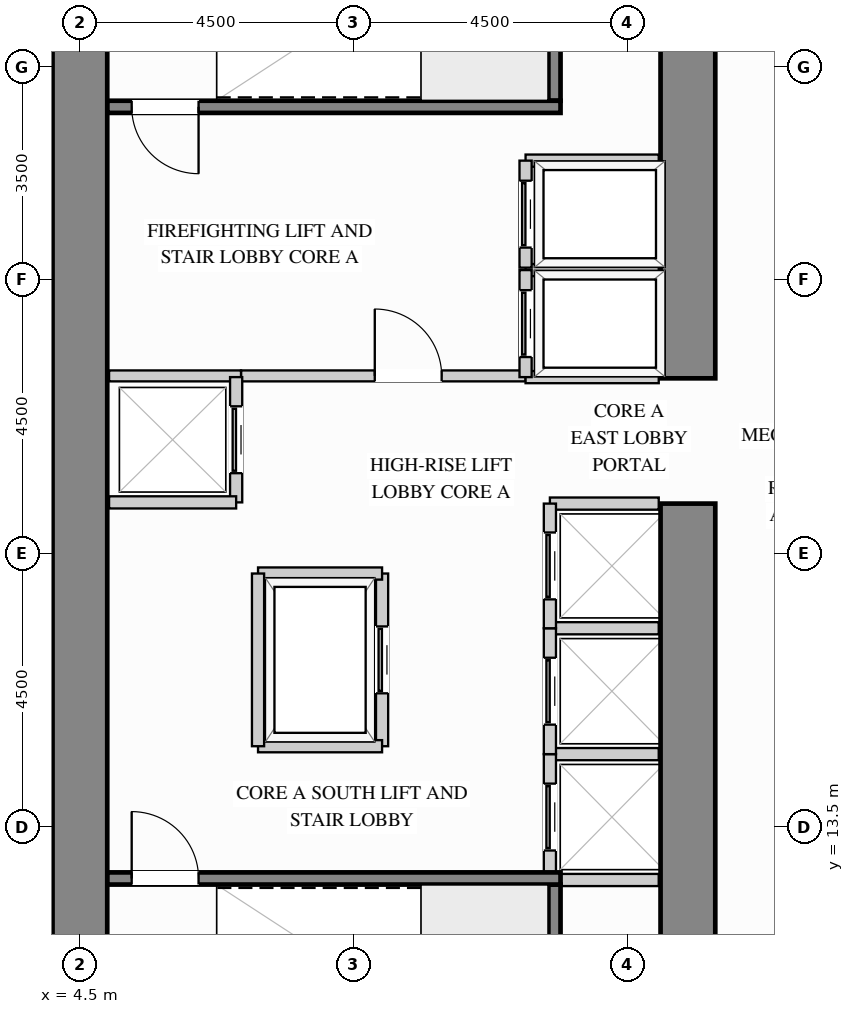
"""IFC4 building model, lengths in metres.
Left out: names, types, materials, properties, quantities, classifications, styles, units other than length and angle.
Written with IfcOpenShell. Run it as: python <this file> out.ifc"""

import sys

from ifc_helpers import new_model, si_unit, direction, frame, frame_2d, origin, place, context, subcontext, project, spatial, rectangle, extrude, source, transform, mapped, element, fill, save


model = new_model("IFC4")
c1 = context("Model", 3, precision=1e-05, world=origin(), true_north=direction((0.0, 1.0)))
c2 = subcontext(c1, "Body", "Model", "MODEL_VIEW")
j1 = project(units=[si_unit("LENGTHUNIT", "METRE"), si_unit("PLANEANGLEUNIT", "RADIAN")], contexts=[c1])
p1 = place(None, origin())
s1 = spatial("IfcSite", under=j1, at=p1, CompositionType="ELEMENT")
p2 = place(p1, origin())
s2 = spatial("IfcBuilding", under=s1, at=p2, CompositionType="ELEMENT")
p3 = place(p2, frame((0.0, 0.0, 72.9)))
s3 = spatial("IfcBuildingStorey", under=s2, at=p3, CompositionType="ELEMENT", Elevation=72.9)
m1 = source(origin(), c2, "Body", "SweptSolid", [
    extrude(rectangle(XDim=9.87, YDim=0.9, at=frame_2d((4.935, 0.0))), origin(), (0.0, 0.0, 1.0), 4.26),
])
p4 = place(p3, frame((14.5, 8.95, 0.0), z_axis=(0.0, 0.0, 1.0), x_axis=(0.0, 1.0, 0.0)))
e1 = element("IfcWall", 1, at=p4, inside=s3, PredefinedType="SHEAR", context=c2, shape_type="MappedRepresentation", body=[
    mapped(m1, transform((0.0, 0.0, 0.0), x_axis=(1.0, 0.0, 0.0), y_axis=(0.0, 1.0, 0.0), z_axis=(0.0, 0.0, 1.0))),
])
m2 = source(origin(), c2, "Body", "SweptSolid", [
    extrude(rectangle(XDim=8.17, YDim=0.9, at=frame_2d((4.085, 0.0))), origin(), (0.0, 0.0, 1.0), 4.26),
])
p5 = place(p3, frame((14.5, 20.88, 0.0), z_axis=(0.0, 0.0, 1.0), x_axis=(0.0, 1.0, 0.0)))
e2 = element("IfcWall", 2, at=p5, inside=s3, PredefinedType="SHEAR", context=c2, shape_type="MappedRepresentation", body=[
    mapped(m2, transform((0.0, 0.0, 0.0), x_axis=(1.0, 0.0, 0.0), y_axis=(0.0, 1.0, 0.0), z_axis=(0.0, 0.0, 1.0))),
])
m3 = source(origin(), c2, "Body", "SweptSolid", [
    extrude(rectangle(XDim=20.1, YDim=0.9, at=frame_2d((10.05, 0.0))), origin(), (0.0, 0.0, 1.0), 4.26),
])
p6 = place(p3, frame((4.5, 8.95, 0.0), z_axis=(0.0, 0.0, 1.0), x_axis=(0.0, 1.0, 0.0)))
e3 = element("IfcWall", 3, at=p6, inside=s3, PredefinedType="SHEAR", context=c2, shape_type="MappedRepresentation", body=[
    mapped(m3, transform((0.0, 0.0, 0.0), x_axis=(1.0, 0.0, 0.0), y_axis=(0.0, 1.0, 0.0), z_axis=(0.0, 0.0, 1.0))),
])
p7 = place(p3, frame((7.15, 20.92, 0.0), z_axis=(0.0, 0.0, 1.0), x_axis=(1.0, 0.0, 0.0)))
e4 = element("IfcWall", 4, at=p7, inside=s3, PredefinedType="PARTITIONING", context=c2, shape_type="SweptSolid", body=[
    extrude(rectangle(XDim=4.68, YDim=0.18, at=frame_2d((2.34, 0.0))), origin(), (0.0, 0.0, 1.0), 4.245),
])
p8 = place(p7, frame((2.2, 0.0, 0.0)))
e5 = element("IfcOpeningElement", 5, at=p8, cuts=e4, PredefinedType="OPENING", context=c2, shape_type="SweptSolid", body=[
    extrude(rectangle(XDim=1.1, YDim=2.15, at=frame_2d((0.55, 1.075))), frame((0.0, 0.1, 0.0), z_axis=(0.0, -1.0, 0.0), x_axis=(1.0, 0.0, 0.0)), (0.0, 0.0, 1.0), 0.2),
])
m4 = source(origin(), c2, "Body", "SweptSolid", [
    extrude(rectangle(XDim=2.17, YDim=0.18, at=frame_2d((1.085, 0.0))), origin(), (0.0, 0.0, 1.0), 4.245),
])
p9 = place(p3, frame((4.98, 20.92, 0.0), z_axis=(0.0, 0.0, 1.0), x_axis=(1.0, 0.0, 0.0)))
e6 = element("IfcWall", 6, at=p9, inside=s3, PredefinedType="PARTITIONING", context=c2, shape_type="MappedRepresentation", body=[
    mapped(m4, transform((0.0, 0.0, 0.0), x_axis=(1.0, 0.0, 0.0), y_axis=(0.0, 1.0, 0.0), z_axis=(0.0, 0.0, 1.0))),
])
m5 = source(origin(), c2, "Body", "SweptSolid", [
    extrude(rectangle(XDim=2.19, YDim=0.2, at=frame_2d((1.095, 0.0))), origin(), (0.0, 0.0, 1.0), 4.245),
])
for number, where, z_axis, x_axis in (
    (7, (11.83, 22.66, 0.0), (0.0, 0.0, 1.0), (1.0, 0.0, 0.0)),
    (8, (11.83, 20.9, 0.0), (0.0, 0.0, 1.0), (1.0, 0.0, 0.0)),
):
    element("IfcWall", number, at=place(p3, frame(where, z_axis=z_axis, x_axis=x_axis)), inside=s3, PredefinedType="PARTITIONING", context=c2, shape_type="MappedRepresentation", body=[
        mapped(m5, transform((0.0, 0.0, 0.0), x_axis=(1.0, 0.0, 0.0), y_axis=(0.0, 1.0, 0.0), z_axis=(0.0, 0.0, 1.0))),
    ])
p10 = place(p3, frame((11.83, 20.9, 0.0), z_axis=(0.0, 0.0, 1.0), x_axis=(0.0, 1.0, 0.0)))
e9 = element("IfcWall", 9, at=p10, inside=s3, PredefinedType="PARTITIONING", context=c2, shape_type="SweptSolid", body=[
    extrude(rectangle(XDim=1.76, YDim=0.2, at=frame_2d((0.88, 0.0))), origin(), (0.0, 0.0, 1.0), 4.245),
])
p11 = place(p10, frame((0.33, 0.0, 0.0)))
e10 = element("IfcOpeningElement", 10, at=p11, cuts=e9, PredefinedType="OPENING", context=c2, shape_type="SweptSolid", body=[
    extrude(rectangle(XDim=1.1, YDim=2.2, at=frame_2d((0.55, 1.1))), frame((0.0, 0.11, 0.0), z_axis=(0.0, -1.0, 0.0), x_axis=(1.0, 0.0, 0.0)), (0.0, 0.0, 1.0), 0.22),
])
p12 = place(p3, frame((11.83, 24.46, 0.0), z_axis=(0.0, 0.0, 1.0), x_axis=(1.0, 0.0, 0.0)))
e11 = element("IfcWall", 11, at=p12, inside=s3, PredefinedType="PARTITIONING", context=c2, shape_type="MappedRepresentation", body=[
    mapped(m5, transform((0.0, 0.0, 0.0), x_axis=(1.0, 0.0, 0.0), y_axis=(0.0, 1.0, 0.0), z_axis=(0.0, 0.0, 1.0))),
])
p13 = place(p3, frame((11.83, 22.7, 0.0), z_axis=(0.0, 0.0, 1.0), x_axis=(0.0, 1.0, 0.0)))
e12 = element("IfcWall", 12, at=p13, inside=s3, PredefinedType="PARTITIONING", context=c2, shape_type="SweptSolid", body=[
    extrude(rectangle(XDim=1.76, YDim=0.2, at=frame_2d((0.88, 0.0))), origin(), (0.0, 0.0, 1.0), 4.245),
])
p14 = place(p13, frame((0.33, 0.0, 0.0)))
e13 = element("IfcOpeningElement", 13, at=p14, cuts=e12, PredefinedType="OPENING", context=c2, shape_type="SweptSolid", body=[
    extrude(rectangle(XDim=1.1, YDim=2.2, at=frame_2d((0.55, 1.1))), frame((0.0, 0.11, 0.0), z_axis=(0.0, -1.0, 0.0), x_axis=(1.0, 0.0, 0.0)), (0.0, 0.0, 1.0), 0.22),
])
m6 = source(origin(), c2, "Body", "SweptSolid", [
    extrude(rectangle(XDim=1.79, YDim=0.2, at=frame_2d((0.895, 0.0))), origin(), (0.0, 0.0, 1.0), 4.245),
])
for number, where, z_axis, x_axis in (
    (14, (12.23, 14.7, 0.0), (0.0, 0.0, 1.0), (1.0, 0.0, 0.0)),
    (15, (12.23, 12.63, 0.0), (0.0, 0.0, 1.0), (1.0, 0.0, 0.0)),
):
    element("IfcWall", number, at=place(p3, frame(where, z_axis=z_axis, x_axis=x_axis)), inside=s3, PredefinedType="PARTITIONING", context=c2, shape_type="MappedRepresentation", body=[
        mapped(m6, transform((0.0, 0.0, 0.0), x_axis=(1.0, 0.0, 0.0), y_axis=(0.0, 1.0, 0.0), z_axis=(0.0, 0.0, 1.0))),
    ])
p15 = place(p3, frame((12.23, 12.63, 0.0), z_axis=(0.0, 0.0, 1.0), x_axis=(0.0, 1.0, 0.0)))
e16 = element("IfcWall", 16, at=p15, inside=s3, PredefinedType="PARTITIONING", context=c2, shape_type="SweptSolid", body=[
    extrude(rectangle(XDim=2.07, YDim=0.2, at=frame_2d((1.035, 0.0))), origin(), (0.0, 0.0, 1.0), 4.245),
])
p16 = place(p15, frame((0.485, 0.0, 0.0)))
e17 = element("IfcOpeningElement", 17, at=p16, cuts=e16, PredefinedType="OPENING", context=c2, shape_type="SweptSolid", body=[
    extrude(rectangle(XDim=1.1, YDim=2.2, at=frame_2d((0.55, 1.1))), frame((0.0, 0.11, 0.0), z_axis=(0.0, -1.0, 0.0), x_axis=(1.0, 0.0, 0.0)), (0.0, 0.0, 1.0), 0.22),
])
p17 = place(p3, frame((12.23, 16.77, 0.0), z_axis=(0.0, 0.0, 1.0), x_axis=(1.0, 0.0, 0.0)))
e18 = element("IfcWall", 18, at=p17, inside=s3, PredefinedType="PARTITIONING", context=c2, shape_type="MappedRepresentation", body=[
    mapped(m6, transform((0.0, 0.0, 0.0), x_axis=(1.0, 0.0, 0.0), y_axis=(0.0, 1.0, 0.0), z_axis=(0.0, 0.0, 1.0))),
])
p18 = place(p3, frame((12.23, 14.7, 0.0), z_axis=(0.0, 0.0, 1.0), x_axis=(0.0, 1.0, 0.0)))
e19 = element("IfcWall", 19, at=p18, inside=s3, PredefinedType="PARTITIONING", context=c2, shape_type="SweptSolid", body=[
    extrude(rectangle(XDim=2.07, YDim=0.2, at=frame_2d((1.035, 0.0))), origin(), (0.0, 0.0, 1.0), 4.245),
])
p19 = place(p18, frame((0.485, 0.0, 0.0)))
e20 = element("IfcOpeningElement", 20, at=p19, cuts=e19, PredefinedType="OPENING", context=c2, shape_type="SweptSolid", body=[
    extrude(rectangle(XDim=1.1, YDim=2.2, at=frame_2d((0.55, 1.1))), frame((0.0, 0.11, 0.0), z_axis=(0.0, -1.0, 0.0), x_axis=(1.0, 0.0, 0.0)), (0.0, 0.0, 1.0), 0.22),
])
p20 = place(p3, frame((12.23, 18.82, 0.0), z_axis=(0.0, 0.0, 1.0), x_axis=(1.0, 0.0, 0.0)))
e21 = element("IfcWall", 21, at=p20, inside=s3, PredefinedType="PARTITIONING", context=c2, shape_type="MappedRepresentation", body=[
    mapped(m6, transform((0.0, 0.0, 0.0), x_axis=(1.0, 0.0, 0.0), y_axis=(0.0, 1.0, 0.0), z_axis=(0.0, 0.0, 1.0))),
])
p21 = place(p3, frame((12.23, 16.77, 0.0), z_axis=(0.0, 0.0, 1.0), x_axis=(0.0, 1.0, 0.0)))
e22 = element("IfcWall", 22, at=p21, inside=s3, PredefinedType="PARTITIONING", context=c2, shape_type="SweptSolid", body=[
    extrude(rectangle(XDim=2.05, YDim=0.2, at=frame_2d((1.025, 0.0))), origin(), (0.0, 0.0, 1.0), 4.245),
])
p22 = place(p21, frame((0.475, 0.0, 0.0)))
e23 = element("IfcOpeningElement", 23, at=p22, cuts=e22, PredefinedType="OPENING", context=c2, shape_type="SweptSolid", body=[
    extrude(rectangle(XDim=1.1, YDim=2.2, at=frame_2d((0.55, 1.1))), frame((0.0, 0.11, 0.0), z_axis=(0.0, -1.0, 0.0), x_axis=(1.0, 0.0, 0.0)), (0.0, 0.0, 1.0), 0.22),
])
p23 = place(p3, frame((7.07, 18.84, 0.0), z_axis=(0.0, 0.0, 1.0), x_axis=(0.0, 1.0, 0.0)))
e24 = element("IfcWall", 24, at=p23, inside=s3, PredefinedType="PARTITIONING", context=c2, shape_type="SweptSolid", body=[
    extrude(rectangle(XDim=2.06, YDim=0.2, at=frame_2d((1.03, 0.0))), origin(), (0.0, 0.0, 1.0), 4.245),
])
p24 = place(p23, frame((0.48, 0.0, 0.0)))
e25 = element("IfcOpeningElement", 25, at=p24, cuts=e24, PredefinedType="OPENING", context=c2, shape_type="SweptSolid", body=[
    extrude(rectangle(XDim=1.1, YDim=2.2, at=frame_2d((0.55, 1.1))), frame((0.0, 0.11, 0.0), z_axis=(0.0, -1.0, 0.0), x_axis=(1.0, 0.0, 0.0)), (0.0, 0.0, 1.0), 0.22),
])
m7 = source(origin(), c2, "Body", "SweptSolid", [
    extrude(rectangle(XDim=2.09, YDim=0.2, at=frame_2d((1.045, 0.0))), origin(), (0.0, 0.0, 1.0), 4.245),
])
p25 = place(p3, frame((4.98, 18.84, 0.0), z_axis=(0.0, 0.0, 1.0), x_axis=(1.0, 0.0, 0.0)))
e26 = element("IfcWall", 26, at=p25, inside=s3, PredefinedType="PARTITIONING", context=c2, shape_type="MappedRepresentation", body=[
    mapped(m7, transform((0.0, 0.0, 0.0), x_axis=(1.0, 0.0, 0.0), y_axis=(0.0, 1.0, 0.0), z_axis=(0.0, 0.0, 1.0))),
])
p26 = place(p3, frame((9.47, 14.83, 0.0), z_axis=(0.0, 0.0, 1.0), x_axis=(0.0, 1.0, 0.0)))
e27 = element("IfcWall", 27, at=p26, inside=s3, PredefinedType="PARTITIONING", context=c2, shape_type="SweptSolid", body=[
    extrude(rectangle(XDim=2.84, YDim=0.2, at=frame_2d((1.42, 0.0))), origin(), (0.0, 0.0, 1.0), 4.245),
])
p27 = place(p26, frame((0.87, 0.0, 0.0)))
e28 = element("IfcOpeningElement", 28, at=p27, cuts=e27, PredefinedType="OPENING", context=c2, shape_type="SweptSolid", body=[
    extrude(rectangle(XDim=1.1, YDim=2.2, at=frame_2d((0.55, 1.1))), frame((0.0, 0.11, 0.0), z_axis=(0.0, -1.0, 0.0), x_axis=(1.0, 0.0, 0.0)), (0.0, 0.0, 1.0), 0.22),
])
m8 = source(origin(), c2, "Body", "SweptSolid", [
    extrude(rectangle(XDim=2.04, YDim=0.2, at=frame_2d((1.02, 0.0))), origin(), (0.0, 0.0, 1.0), 4.245),
])
for number, where, z_axis, x_axis in (
    (29, (7.43, 17.67, 0.0), (0.0, 0.0, 1.0), (1.0, 0.0, 0.0)),
    (30, (7.43, 14.83, 0.0), (0.0, 0.0, 1.0), (1.0, 0.0, 0.0)),
):
    element("IfcWall", number, at=place(p3, frame(where, z_axis=z_axis, x_axis=x_axis)), inside=s3, PredefinedType="PARTITIONING", context=c2, shape_type="MappedRepresentation", body=[
        mapped(m8, transform((0.0, 0.0, 0.0), x_axis=(1.0, 0.0, 0.0), y_axis=(0.0, 1.0, 0.0), z_axis=(0.0, 0.0, 1.0))),
    ])
m9 = source(origin(), c2, "Body", "SweptSolid", [
    extrude(rectangle(XDim=2.84, YDim=0.2, at=frame_2d((1.42, 0.0))), origin(), (0.0, 0.0, 1.0), 4.245),
])
p28 = place(p3, frame((7.43, 14.83, 0.0), z_axis=(0.0, 0.0, 1.0), x_axis=(0.0, 1.0, 0.0)))
e31 = element("IfcWall", 31, at=p28, inside=s3, PredefinedType="PARTITIONING", context=c2, shape_type="MappedRepresentation", body=[
    mapped(m9, transform((0.0, 0.0, 0.0), x_axis=(1.0, 0.0, 0.0), y_axis=(0.0, 1.0, 0.0), z_axis=(0.0, 0.0, 1.0))),
])
m10 = source(origin(), c2, "Body", "SweptSolid", [
    extrude(rectangle(XDim=3.603, YDim=0.2, at=frame_2d((1.802, 0.0))), origin(), (0.0, 0.0, 1.0), 4.26),
])
p29 = place(p3, frame((12.305, 8.952, 0.0), z_axis=(0.0, 0.0, 1.0), x_axis=(0.0, 1.0, 0.0)))
e32 = element("IfcWall", 32, at=p29, inside=s3, PredefinedType="SHEAR", context=c2, shape_type="MappedRepresentation", body=[
    mapped(m10, transform((0.0, 0.0, 0.0), x_axis=(1.0, 0.0, 0.0), y_axis=(0.0, 1.0, 0.0), z_axis=(0.0, 0.0, 1.0))),
])
p30 = place(p3, frame((4.952, 12.655, 0.0), z_axis=(0.0, 0.0, 1.0), x_axis=(1.0, 0.0, 0.0)))
e33 = element("IfcWall", 33, at=p30, inside=s3, PredefinedType="SHEAR", context=c2, shape_type="SweptSolid", body=[
    extrude(rectangle(XDim=7.453, YDim=0.2, at=frame_2d((3.727, 0.0))), origin(), (0.0, 0.0, 1.0), 4.26),
])
p31 = place(p30, frame((0.4, 0.0, 0.0)))
e34 = element("IfcOpeningElement", 34, at=p31, cuts=e33, PredefinedType="OPENING", context=c2, shape_type="SweptSolid", body=[
    extrude(rectangle(XDim=1.1, YDim=2.15, at=frame_2d((0.55, 1.075))), frame((0.0, 0.11, 0.0), z_axis=(0.0, -1.0, 0.0), x_axis=(1.0, 0.0, 0.0)), (0.0, 0.0, 1.0), 0.22),
])
p32 = place(p3, frame((12.305, 25.445, 0.0), z_axis=(0.0, 0.0, 1.0), x_axis=(0.0, 1.0, 0.0)))
e35 = element("IfcWall", 35, at=p32, inside=s3, PredefinedType="SHEAR", context=c2, shape_type="MappedRepresentation", body=[
    mapped(m10, transform((0.0, 0.0, 0.0), x_axis=(1.0, 0.0, 0.0), y_axis=(0.0, 1.0, 0.0), z_axis=(0.0, 0.0, 1.0))),
])
p33 = place(p3, frame((4.952, 25.345, 0.0), z_axis=(0.0, 0.0, 1.0), x_axis=(1.0, 0.0, 0.0)))
e36 = element("IfcWall", 36, at=p33, inside=s3, PredefinedType="SHEAR", context=c2, shape_type="SweptSolid", body=[
    extrude(rectangle(XDim=7.453, YDim=0.2, at=frame_2d((3.727, 0.0))), origin(), (0.0, 0.0, 1.0), 4.26),
])
p34 = place(p33, frame((0.4, 0.0, 0.0)))
e37 = element("IfcOpeningElement", 37, at=p34, cuts=e36, PredefinedType="OPENING", context=c2, shape_type="SweptSolid", body=[
    extrude(rectangle(XDim=1.1, YDim=2.15, at=frame_2d((0.55, 1.075))), frame((0.0, 0.11, 0.0), z_axis=(0.0, -1.0, 0.0), x_axis=(1.0, 0.0, 0.0)), (0.0, 0.0, 1.0), 0.22),
])
m11 = source(origin(), c2, "Body", "SweptSolid", [
    extrude(rectangle(XDim=1.1, YDim=2.15, at=frame_2d((0.55, 1.075))), frame((0.0, 0.025, 0.0), z_axis=(0.0, -1.0, 0.0), x_axis=(1.0, 0.0, 0.0)), (0.0, 0.0, 1.0), 0.05),
])
p35 = place(p8, origin())
e38 = element("IfcDoor", 38, at=p35, inside=s3, OperationType="SINGLE_SWING_LEFT", PredefinedType="DOOR", context=c2, shape_type="MappedRepresentation", body=[
    mapped(m11, transform((0.0, 0.0, 0.0), x_axis=(1.0, 0.0, 0.0), y_axis=(0.0, 1.0, 0.0), z_axis=(0.0, 0.0, 1.0))),
])
fill(e5, e38)
m12 = source(origin(), c2, "Body", "SweptSolid", [
    extrude(rectangle(XDim=1.1, YDim=2.2, at=frame_2d((0.55, 1.1))), frame((0.0, 0.025, 0.0), z_axis=(0.0, -1.0, 0.0), x_axis=(1.0, 0.0, 0.0)), (0.0, 0.0, 1.0), 0.05),
])
p36 = place(p11, origin())
e39 = element("IfcDoor", 39, at=p36, inside=s3, OperationType="SLIDING_TO_LEFT", PredefinedType="DOOR", context=c2, shape_type="MappedRepresentation", body=[
    mapped(m12, transform((0.0, 0.0, 0.0), x_axis=(1.0, 0.0, 0.0), y_axis=(0.0, 1.0, 0.0), z_axis=(0.0, 0.0, 1.0))),
])
fill(e10, e39)
p37 = place(p14, origin())
e40 = element("IfcDoor", 40, at=p37, inside=s3, OperationType="SLIDING_TO_LEFT", PredefinedType="DOOR", context=c2, shape_type="MappedRepresentation", body=[
    mapped(m12, transform((0.0, 0.0, 0.0), x_axis=(1.0, 0.0, 0.0), y_axis=(0.0, 1.0, 0.0), z_axis=(0.0, 0.0, 1.0))),
])
fill(e13, e40)
p38 = place(p16, origin())
e41 = element("IfcDoor", 41, at=p38, inside=s3, OperationType="SLIDING_TO_LEFT", PredefinedType="DOOR", context=c2, shape_type="MappedRepresentation", body=[
    mapped(m12, transform((0.0, 0.0, 0.0), x_axis=(1.0, 0.0, 0.0), y_axis=(0.0, 1.0, 0.0), z_axis=(0.0, 0.0, 1.0))),
])
fill(e17, e41)
p39 = place(p19, origin())
e42 = element("IfcDoor", 42, at=p39, inside=s3, OperationType="SLIDING_TO_LEFT", PredefinedType="DOOR", context=c2, shape_type="MappedRepresentation", body=[
    mapped(m12, transform((0.0, 0.0, 0.0), x_axis=(1.0, 0.0, 0.0), y_axis=(0.0, 1.0, 0.0), z_axis=(0.0, 0.0, 1.0))),
])
fill(e20, e42)
p40 = place(p22, origin())
e43 = element("IfcDoor", 43, at=p40, inside=s3, OperationType="SLIDING_TO_LEFT", PredefinedType="DOOR", context=c2, shape_type="MappedRepresentation", body=[
    mapped(m12, transform((0.0, 0.0, 0.0), x_axis=(1.0, 0.0, 0.0), y_axis=(0.0, 1.0, 0.0), z_axis=(0.0, 0.0, 1.0))),
])
fill(e23, e43)
p41 = place(p24, origin())
e44 = element("IfcDoor", 44, at=p41, inside=s3, OperationType="SLIDING_TO_LEFT", PredefinedType="DOOR", context=c2, shape_type="MappedRepresentation", body=[
    mapped(m12, transform((0.0, 0.0, 0.0), x_axis=(1.0, 0.0, 0.0), y_axis=(0.0, 1.0, 0.0), z_axis=(0.0, 0.0, 1.0))),
])
fill(e25, e44)
p42 = place(p27, origin())
e45 = element("IfcDoor", 45, at=p42, inside=s3, OperationType="SLIDING_TO_LEFT", PredefinedType="DOOR", context=c2, shape_type="MappedRepresentation", body=[
    mapped(m12, transform((0.0, 0.0, 0.0), x_axis=(1.0, 0.0, 0.0), y_axis=(0.0, 1.0, 0.0), z_axis=(0.0, 0.0, 1.0))),
])
fill(e28, e45)
m13 = source(origin(), c2, "Body", "SweptSolid", [
    extrude(rectangle(XDim=1.1, YDim=2.15, at=frame_2d((0.55, 1.075))), frame((0.0, 0.025, 0.0), z_axis=(0.0, -1.0, 0.0), x_axis=(1.0, 0.0, 0.0)), (0.0, 0.0, 1.0), 0.05),
])
p43 = place(p31, origin())
e46 = element("IfcDoor", 46, at=p43, inside=s3, OperationType="SINGLE_SWING_LEFT", PredefinedType="DOOR", context=c2, shape_type="MappedRepresentation", body=[
    mapped(m13, transform((0.0, 0.0, 0.0), x_axis=(1.0, 0.0, 0.0), y_axis=(0.0, 1.0, 0.0), z_axis=(0.0, 0.0, 1.0))),
])
fill(e34, e46)
p44 = place(p34, origin())
e47 = element("IfcDoor", 47, at=p44, inside=s3, OperationType="SINGLE_SWING_RIGHT", PredefinedType="DOOR", context=c2, shape_type="MappedRepresentation", body=[
    mapped(m13, transform((0.0, 0.0, 0.0), x_axis=(1.0, 0.0, 0.0), y_axis=(0.0, 1.0, 0.0), z_axis=(0.0, 0.0, 1.0))),
])
fill(e37, e47)
save(model, sys.argv[1])
